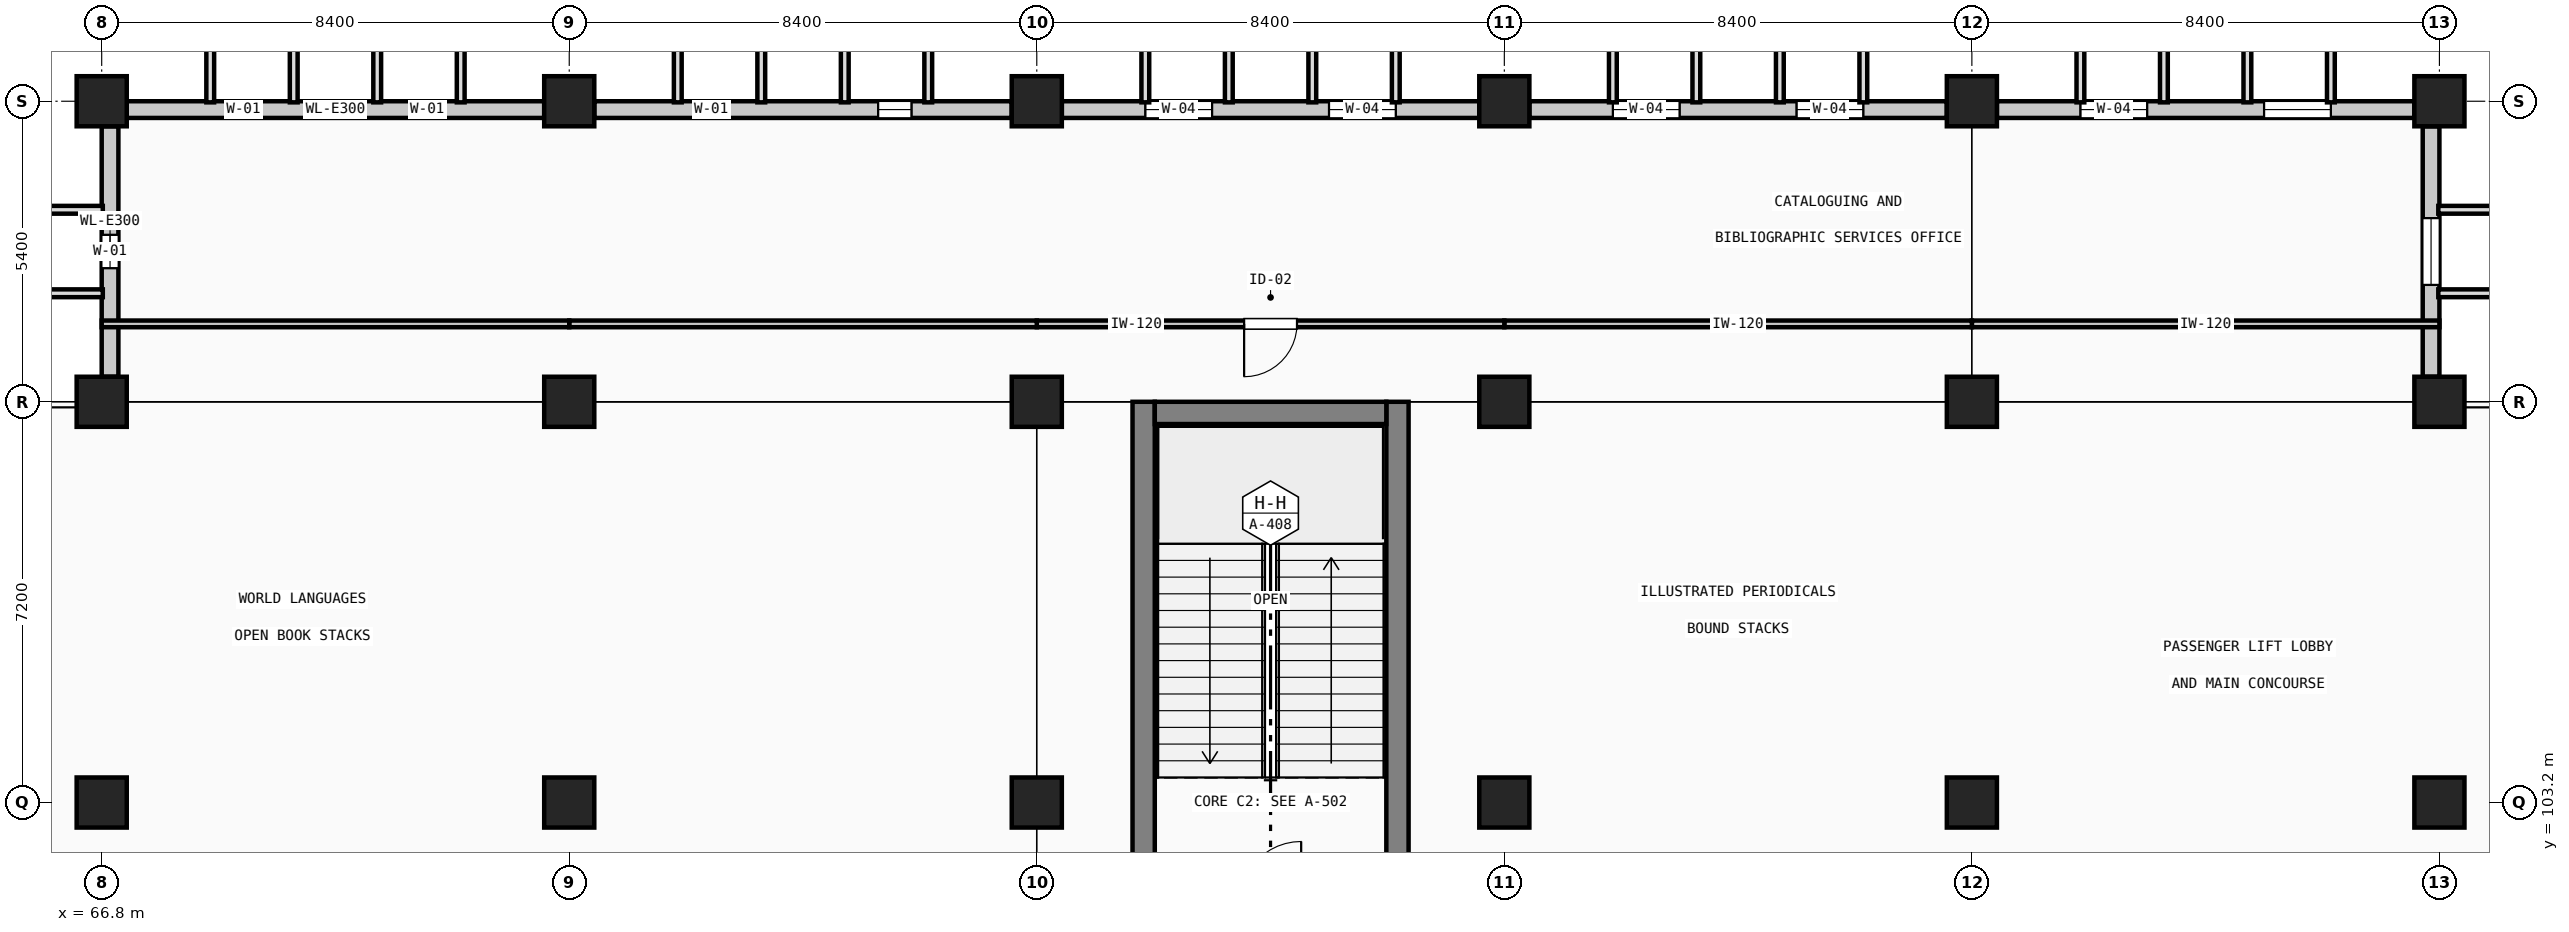
"""IFC4 building model, lengths in metres.
Left out: names, types, materials, properties, quantities, classifications, styles, units other than length and angle.
Written with IfcOpenShell. Run it as: python <this file> out.ifc"""

import sys

from ifc_helpers import new_model, si_unit, direction, frame, frame_2d, origin, origin_2d, place, context, subcontext, project, spatial, rectangle, extrude, element, fill, save


model = new_model("IFC4")
c1 = context("Model", 3, precision=1e-05, world=origin(), true_north=direction((0.0, 1.0)))
c2 = subcontext(c1, "Body", "Model", "MODEL_VIEW")
j1 = project(units=[si_unit("LENGTHUNIT", "METRE"), si_unit("PLANEANGLEUNIT", "RADIAN")], contexts=[c1])
p1 = place(None, origin())
s1 = spatial("IfcSite", under=j1, at=p1, CompositionType="ELEMENT")
p2 = place(p1, origin())
s2 = spatial("IfcBuilding", under=s1, at=p2, CompositionType="ELEMENT")
p3 = place(p2, frame((0.0, 0.0, 4.8)))
s3 = spatial("IfcBuildingStorey", under=s2, at=p3, CompositionType="ELEMENT", Elevation=4.8)
for number, where, z_axis, x_axis in (
    (1, (66.8, 103.2, 0.0), (0.0, 0.0, 1.0), (1.0, 0.0, 0.0)),
    (2, (66.8, 110.4, 0.0), (0.0, 0.0, 1.0), (1.0, 0.0, 0.0)),
    (3, (66.8, 115.8, 0.0), (0.0, 0.0, 1.0), (1.0, 0.0, 0.0)),
    (4, (75.2, 103.2, 0.0), (0.0, 0.0, 1.0), (1.0, 0.0, 0.0)),
    (5, (75.2, 110.4, 0.0), (0.0, 0.0, 1.0), (1.0, 0.0, 0.0)),
    (6, (75.2, 115.8, 0.0), (0.0, 0.0, 1.0), (1.0, 0.0, 0.0)),
    (7, (83.6, 103.2, 0.0), (0.0, 0.0, 1.0), (1.0, 0.0, 0.0)),
    (8, (83.6, 110.4, 0.0), (0.0, 0.0, 1.0), (1.0, 0.0, 0.0)),
    (9, (83.6, 115.8, 0.0), (0.0, 0.0, 1.0), (1.0, 0.0, 0.0)),
    (10, (92.0, 103.2, 0.0), (0.0, 0.0, 1.0), (1.0, 0.0, 0.0)),
    (11, (92.0, 110.4, 0.0), (0.0, 0.0, 1.0), (1.0, 0.0, 0.0)),
    (12, (92.0, 115.8, 0.0), (0.0, 0.0, 1.0), (1.0, 0.0, 0.0)),
    (13, (100.4, 103.2, 0.0), (0.0, 0.0, 1.0), (1.0, 0.0, 0.0)),
    (14, (100.4, 110.4, 0.0), (0.0, 0.0, 1.0), (1.0, 0.0, 0.0)),
    (15, (100.4, 115.8, 0.0), (0.0, 0.0, 1.0), (1.0, 0.0, 0.0)),
    (16, (108.8, 103.2, 0.0), (0.0, 0.0, 1.0), (1.0, 0.0, 0.0)),
    (17, (108.8, 110.4, 0.0), (0.0, 0.0, 1.0), (1.0, 0.0, 0.0)),
    (18, (108.8, 115.8, 0.0), (0.0, 0.0, 1.0), (1.0, 0.0, 0.0)),
):
    element("IfcColumn", number, at=place(p3, frame(where, z_axis=z_axis, x_axis=x_axis)), inside=s3, PredefinedType="COLUMN", context=c2, shape_type="SweptSolid", body=[
        extrude(rectangle(XDim=0.9, YDim=0.9, at=origin_2d()), origin(), (0.0, 0.0, 1.0), 4.8),
    ])
for number, where, z_axis, x_axis in (
    (19, (85.52, 101.2, 0.0), (0.0, 0.0, 1.0), (0.0, 1.0, 0.0)),
    (20, (90.08, 110.4, 0.0), (0.0, 0.0, 1.0), (0.0, -1.0, 0.0)),
):
    element("IfcWall", number, at=place(p3, frame(where, z_axis=z_axis, x_axis=x_axis)), inside=s3, PredefinedType="SHEAR", context=c2, shape_type="SweptSolid", body=[
        extrude(rectangle(XDim=9.2, YDim=0.4, at=frame_2d((4.6, 0.0))), origin(), (0.0, 0.0, 1.0), 4.525),
    ])
p4 = place(p3, frame((85.72, 110.2, 0.0), z_axis=(0.0, 0.0, 1.0), x_axis=(1.0, 0.0, 0.0)))
e21 = element("IfcWall", 21, at=p4, inside=s3, PredefinedType="SHEAR", context=c2, shape_type="SweptSolid", body=[
    extrude(rectangle(XDim=4.16, YDim=0.4, at=frame_2d((2.08, 0.0))), origin(), (0.0, 0.0, 1.0), 4.525),
])
p5 = place(p3, frame((66.95, 110.85, 0.0), z_axis=(0.0, 0.0, 1.0), x_axis=(0.0, 1.0, 0.0)))
e22 = element("IfcWall", 22, at=p5, inside=s3, PredefinedType="SOLIDWALL", context=c2, shape_type="SweptSolid", body=[
    extrude(rectangle(XDim=4.5, YDim=0.3, at=frame_2d((2.25, 0.0))), origin(), (0.0, 0.0, 1.0), 4.2),
])
p6 = place(p5, frame((1.95, 0.0, 0.9)))
e23 = element("IfcOpeningElement", 23, at=p6, cuts=e22, PredefinedType="OPENING", context=c2, shape_type="SweptSolid", body=[
    extrude(rectangle(XDim=0.6, YDim=2.4, at=frame_2d((0.3, 1.2))), frame((0.0, 0.16, 0.0), z_axis=(0.0, -1.0, 0.0), x_axis=(1.0, 0.0, 0.0)), (0.0, 0.0, 1.0), 0.32),
])
p7 = place(p3, frame((67.25, 115.65, 0.0), z_axis=(0.0, 0.0, 1.0), x_axis=(1.0, 0.0, 0.0)))
e24 = element("IfcWall", 24, at=p7, inside=s3, PredefinedType="SOLIDWALL", context=c2, shape_type="SweptSolid", body=[
    extrude(rectangle(XDim=7.5, YDim=0.3, at=frame_2d((3.75, 0.0))), origin(), (0.0, 0.0, 1.0), 3.85),
])
p8 = place(p7, frame((1.8, 0.0, 0.9)))
e25 = element("IfcOpeningElement", 25, at=p8, cuts=e24, PredefinedType="OPENING", context=c2, shape_type="SweptSolid", body=[
    extrude(rectangle(XDim=0.6, YDim=2.4, at=frame_2d((0.3, 1.2))), frame((0.0, 0.16, 0.0), z_axis=(0.0, -1.0, 0.0), x_axis=(1.0, 0.0, 0.0)), (0.0, 0.0, 1.0), 0.32),
])
p9 = place(p7, frame((5.1, 0.0, 0.9)))
e26 = element("IfcOpeningElement", 26, at=p9, cuts=e24, PredefinedType="OPENING", context=c2, shape_type="SweptSolid", body=[
    extrude(rectangle(XDim=0.6, YDim=2.4, at=frame_2d((0.3, 1.2))), frame((0.0, 0.16, 0.0), z_axis=(0.0, -1.0, 0.0), x_axis=(1.0, 0.0, 0.0)), (0.0, 0.0, 1.0), 0.32),
])
p10 = place(p3, frame((75.65, 115.65, 0.0), z_axis=(0.0, 0.0, 1.0), x_axis=(1.0, 0.0, 0.0)))
e27 = element("IfcWall", 27, at=p10, inside=s3, PredefinedType="SOLIDWALL", context=c2, shape_type="SweptSolid", body=[
    extrude(rectangle(XDim=7.5, YDim=0.3, at=frame_2d((3.75, 0.0))), origin(), (0.0, 0.0, 1.0), 3.85),
])
p11 = place(p10, frame((1.8, 0.0, 0.9)))
e28 = element("IfcOpeningElement", 28, at=p11, cuts=e27, PredefinedType="OPENING", context=c2, shape_type="SweptSolid", body=[
    extrude(rectangle(XDim=0.6, YDim=2.4, at=frame_2d((0.3, 1.2))), frame((0.0, 0.16, 0.0), z_axis=(0.0, -1.0, 0.0), x_axis=(1.0, 0.0, 0.0)), (0.0, 0.0, 1.0), 0.32),
])
p12 = place(p10, frame((5.1, 0.0, 0.9)))
e29 = element("IfcOpeningElement", 29, at=p12, cuts=e27, PredefinedType="OPENING", context=c2, shape_type="SweptSolid", body=[
    extrude(rectangle(XDim=0.6, YDim=2.4, at=frame_2d((0.3, 1.2))), frame((0.0, 0.16, 0.0), z_axis=(0.0, -1.0, 0.0), x_axis=(1.0, 0.0, 0.0)), (0.0, 0.0, 1.0), 0.32),
])
p13 = place(p3, frame((84.05, 115.65, 0.0), z_axis=(0.0, 0.0, 1.0), x_axis=(1.0, 0.0, 0.0)))
e30 = element("IfcWall", 30, at=p13, inside=s3, PredefinedType="SOLIDWALL", context=c2, shape_type="SweptSolid", body=[
    extrude(rectangle(XDim=7.5, YDim=0.3, at=frame_2d((3.75, 0.0))), origin(), (0.0, 0.0, 1.0), 3.85),
])
p14 = place(p13, frame((1.5, 0.0, 0.9)))
e31 = element("IfcOpeningElement", 31, at=p14, cuts=e30, PredefinedType="OPENING", context=c2, shape_type="SweptSolid", body=[
    extrude(rectangle(XDim=1.2, YDim=1.8, at=frame_2d((0.6, 0.9))), frame((0.0, 0.16, 0.0), z_axis=(0.0, -1.0, 0.0), x_axis=(1.0, 0.0, 0.0)), (0.0, 0.0, 1.0), 0.32),
])
p15 = place(p13, frame((4.8, 0.0, 0.9)))
e32 = element("IfcOpeningElement", 32, at=p15, cuts=e30, PredefinedType="OPENING", context=c2, shape_type="SweptSolid", body=[
    extrude(rectangle(XDim=1.2, YDim=1.8, at=frame_2d((0.6, 0.9))), frame((0.0, 0.16, 0.0), z_axis=(0.0, -1.0, 0.0), x_axis=(1.0, 0.0, 0.0)), (0.0, 0.0, 1.0), 0.32),
])
p16 = place(p3, frame((92.45, 115.65, 0.0), z_axis=(0.0, 0.0, 1.0), x_axis=(1.0, 0.0, 0.0)))
e33 = element("IfcWall", 33, at=p16, inside=s3, PredefinedType="SOLIDWALL", context=c2, shape_type="SweptSolid", body=[
    extrude(rectangle(XDim=7.5, YDim=0.3, at=frame_2d((3.75, 0.0))), origin(), (0.0, 0.0, 1.0), 3.85),
])
p17 = place(p16, frame((1.5, 0.0, 0.9)))
e34 = element("IfcOpeningElement", 34, at=p17, cuts=e33, PredefinedType="OPENING", context=c2, shape_type="SweptSolid", body=[
    extrude(rectangle(XDim=1.2, YDim=1.8, at=frame_2d((0.6, 0.9))), frame((0.0, 0.16, 0.0), z_axis=(0.0, -1.0, 0.0), x_axis=(1.0, 0.0, 0.0)), (0.0, 0.0, 1.0), 0.32),
])
p18 = place(p16, frame((4.8, 0.0, 0.9)))
e35 = element("IfcOpeningElement", 35, at=p18, cuts=e33, PredefinedType="OPENING", context=c2, shape_type="SweptSolid", body=[
    extrude(rectangle(XDim=1.2, YDim=1.8, at=frame_2d((0.6, 0.9))), frame((0.0, 0.16, 0.0), z_axis=(0.0, -1.0, 0.0), x_axis=(1.0, 0.0, 0.0)), (0.0, 0.0, 1.0), 0.32),
])
p19 = place(p3, frame((100.85, 115.65, 0.0), z_axis=(0.0, 0.0, 1.0), x_axis=(1.0, 0.0, 0.0)))
e36 = element("IfcWall", 36, at=p19, inside=s3, PredefinedType="SOLIDWALL", context=c2, shape_type="SweptSolid", body=[
    extrude(rectangle(XDim=7.5, YDim=0.3, at=frame_2d((3.75, 0.0))), origin(), (0.0, 0.0, 1.0), 3.85),
])
p20 = place(p19, frame((1.5, 0.0, 0.9)))
e37 = element("IfcOpeningElement", 37, at=p20, cuts=e36, PredefinedType="OPENING", context=c2, shape_type="SweptSolid", body=[
    extrude(rectangle(XDim=1.2, YDim=1.8, at=frame_2d((0.6, 0.9))), frame((0.0, 0.16, 0.0), z_axis=(0.0, -1.0, 0.0), x_axis=(1.0, 0.0, 0.0)), (0.0, 0.0, 1.0), 0.32),
])
p21 = place(p19, frame((4.8, 0.0, 0.9)))
e38 = element("IfcOpeningElement", 38, at=p21, cuts=e36, PredefinedType="OPENING", context=c2, shape_type="SweptSolid", body=[
    extrude(rectangle(XDim=1.2, YDim=1.8, at=frame_2d((0.6, 0.9))), frame((0.0, 0.16, 0.0), z_axis=(0.0, -1.0, 0.0), x_axis=(1.0, 0.0, 0.0)), (0.0, 0.0, 1.0), 0.32),
])
p22 = place(p3, frame((108.65, 115.35, 0.0), z_axis=(0.0, 0.0, 1.0), x_axis=(0.0, -1.0, 0.0)))
e39 = element("IfcWall", 39, at=p22, inside=s3, PredefinedType="SOLIDWALL", context=c2, shape_type="SweptSolid", body=[
    extrude(rectangle(XDim=4.5, YDim=0.3, at=frame_2d((2.25, 0.0))), origin(), (0.0, 0.0, 1.0), 4.2),
])
p23 = place(p22, frame((1.65, 0.0, 0.9)))
e40 = element("IfcOpeningElement", 40, at=p23, cuts=e39, PredefinedType="OPENING", context=c2, shape_type="SweptSolid", body=[
    extrude(rectangle(XDim=1.2, YDim=1.8, at=frame_2d((0.6, 0.9))), frame((0.0, 0.16, 0.0), z_axis=(0.0, -1.0, 0.0), x_axis=(1.0, 0.0, 0.0)), (0.0, 0.0, 1.0), 0.32),
])
p24 = place(p3, frame((108.8, 111.8, 0.0), z_axis=(0.0, 0.0, 1.0), x_axis=(-1.0, 0.0, 0.0)))
e41 = element("IfcWall", 41, at=p24, inside=s3, PredefinedType="PARTITIONING", context=c2, shape_type="SweptSolid", body=[
    extrude(rectangle(XDim=8.4, YDim=0.12, at=frame_2d((4.2, 0.0))), origin(), (0.0, 0.0, 1.0), 4.5),
])
p25 = place(p3, frame((100.4, 111.8, 0.0), z_axis=(0.0, 0.0, 1.0), x_axis=(-1.0, 0.0, 0.0)))
e42 = element("IfcWall", 42, at=p25, inside=s3, PredefinedType="PARTITIONING", context=c2, shape_type="SweptSolid", body=[
    extrude(rectangle(XDim=8.4, YDim=0.12, at=frame_2d((4.2, 0.0))), origin(), (0.0, 0.0, 1.0), 4.5),
])
p26 = place(p3, frame((92.0, 111.8, 0.0), z_axis=(0.0, 0.0, 1.0), x_axis=(-1.0, 0.0, 0.0)))
e43 = element("IfcWall", 43, at=p26, inside=s3, PredefinedType="PARTITIONING", context=c2, shape_type="SweptSolid", body=[
    extrude(rectangle(XDim=8.4, YDim=0.12, at=frame_2d((4.2, 0.0))), origin(), (0.0, 0.0, 1.0), 4.5),
])
p27 = place(p26, frame((3.725, 0.0, 0.0)))
e44 = element("IfcOpeningElement", 44, at=p27, cuts=e43, PredefinedType="OPENING", context=c2, shape_type="SweptSolid", body=[
    extrude(rectangle(XDim=0.95, YDim=2.15, at=frame_2d((0.475, 1.075))), frame((0.0, 0.07, 0.0), z_axis=(0.0, -1.0, 0.0), x_axis=(1.0, 0.0, 0.0)), (0.0, 0.0, 1.0), 0.14),
])
p28 = place(p3, frame((83.6, 111.8, 0.0), z_axis=(0.0, 0.0, 1.0), x_axis=(-1.0, 0.0, 0.0)))
e45 = element("IfcWall", 45, at=p28, inside=s3, PredefinedType="PARTITIONING", context=c2, shape_type="SweptSolid", body=[
    extrude(rectangle(XDim=8.4, YDim=0.12, at=frame_2d((4.2, 0.0))), origin(), (0.0, 0.0, 1.0), 4.5),
])
p29 = place(p3, frame((75.2, 111.8, 0.0), z_axis=(0.0, 0.0, 1.0), x_axis=(-1.0, 0.0, 0.0)))
e46 = element("IfcWall", 46, at=p29, inside=s3, PredefinedType="PARTITIONING", context=c2, shape_type="SweptSolid", body=[
    extrude(rectangle(XDim=8.4, YDim=0.12, at=frame_2d((4.2, 0.0))), origin(), (0.0, 0.0, 1.0), 4.5),
])
p30 = place(p6, origin())
e47 = element("IfcWindow", 47, at=p30, inside=s3, PartitioningType="SINGLE_PANEL", PredefinedType="WINDOW", context=c2, shape_type="SweptSolid", body=[
    extrude(rectangle(XDim=0.6, YDim=2.4, at=frame_2d((0.3, 1.2))), frame((0.0, 0.03, 0.0), z_axis=(0.0, -1.0, 0.0), x_axis=(1.0, 0.0, 0.0)), (0.0, 0.0, 1.0), 0.06),
])
fill(e23, e47)
p31 = place(p8, origin())
e48 = element("IfcWindow", 48, at=p31, inside=s3, PartitioningType="SINGLE_PANEL", PredefinedType="WINDOW", context=c2, shape_type="SweptSolid", body=[
    extrude(rectangle(XDim=0.6, YDim=2.4, at=frame_2d((0.3, 1.2))), frame((0.0, 0.03, 0.0), z_axis=(0.0, -1.0, 0.0), x_axis=(1.0, 0.0, 0.0)), (0.0, 0.0, 1.0), 0.06),
])
fill(e25, e48)
p32 = place(p9, origin())
e49 = element("IfcWindow", 49, at=p32, inside=s3, PartitioningType="SINGLE_PANEL", PredefinedType="WINDOW", context=c2, shape_type="SweptSolid", body=[
    extrude(rectangle(XDim=0.6, YDim=2.4, at=frame_2d((0.3, 1.2))), frame((0.0, 0.03, 0.0), z_axis=(0.0, -1.0, 0.0), x_axis=(1.0, 0.0, 0.0)), (0.0, 0.0, 1.0), 0.06),
])
fill(e26, e49)
p33 = place(p11, origin())
e50 = element("IfcWindow", 50, at=p33, inside=s3, PartitioningType="SINGLE_PANEL", PredefinedType="WINDOW", context=c2, shape_type="SweptSolid", body=[
    extrude(rectangle(XDim=0.6, YDim=2.4, at=frame_2d((0.3, 1.2))), frame((0.0, 0.03, 0.0), z_axis=(0.0, -1.0, 0.0), x_axis=(1.0, 0.0, 0.0)), (0.0, 0.0, 1.0), 0.06),
])
fill(e28, e50)
p34 = place(p12, origin())
e51 = element("IfcWindow", 51, at=p34, inside=s3, PartitioningType="SINGLE_PANEL", PredefinedType="WINDOW", context=c2, shape_type="SweptSolid", body=[
    extrude(rectangle(XDim=0.6, YDim=2.4, at=frame_2d((0.3, 1.2))), frame((0.0, 0.03, 0.0), z_axis=(0.0, -1.0, 0.0), x_axis=(1.0, 0.0, 0.0)), (0.0, 0.0, 1.0), 0.06),
])
fill(e29, e51)
p35 = place(p14, origin())
e52 = element("IfcWindow", 52, at=p35, inside=s3, PartitioningType="SINGLE_PANEL", PredefinedType="WINDOW", context=c2, shape_type="SweptSolid", body=[
    extrude(rectangle(XDim=1.2, YDim=1.8, at=frame_2d((0.6, 0.9))), frame((0.0, 0.03, 0.0), z_axis=(0.0, -1.0, 0.0), x_axis=(1.0, 0.0, 0.0)), (0.0, 0.0, 1.0), 0.06),
])
fill(e31, e52)
p36 = place(p15, origin())
e53 = element("IfcWindow", 53, at=p36, inside=s3, PartitioningType="SINGLE_PANEL", PredefinedType="WINDOW", context=c2, shape_type="SweptSolid", body=[
    extrude(rectangle(XDim=1.2, YDim=1.8, at=frame_2d((0.6, 0.9))), frame((0.0, 0.03, 0.0), z_axis=(0.0, -1.0, 0.0), x_axis=(1.0, 0.0, 0.0)), (0.0, 0.0, 1.0), 0.06),
])
fill(e32, e53)
p37 = place(p17, origin())
e54 = element("IfcWindow", 54, at=p37, inside=s3, PartitioningType="SINGLE_PANEL", PredefinedType="WINDOW", context=c2, shape_type="SweptSolid", body=[
    extrude(rectangle(XDim=1.2, YDim=1.8, at=frame_2d((0.6, 0.9))), frame((0.0, 0.03, 0.0), z_axis=(0.0, -1.0, 0.0), x_axis=(1.0, 0.0, 0.0)), (0.0, 0.0, 1.0), 0.06),
])
fill(e34, e54)
p38 = place(p18, origin())
e55 = element("IfcWindow", 55, at=p38, inside=s3, PartitioningType="SINGLE_PANEL", PredefinedType="WINDOW", context=c2, shape_type="SweptSolid", body=[
    extrude(rectangle(XDim=1.2, YDim=1.8, at=frame_2d((0.6, 0.9))), frame((0.0, 0.03, 0.0), z_axis=(0.0, -1.0, 0.0), x_axis=(1.0, 0.0, 0.0)), (0.0, 0.0, 1.0), 0.06),
])
fill(e35, e55)
p39 = place(p20, origin())
e56 = element("IfcWindow", 56, at=p39, inside=s3, PartitioningType="SINGLE_PANEL", PredefinedType="WINDOW", context=c2, shape_type="SweptSolid", body=[
    extrude(rectangle(XDim=1.2, YDim=1.8, at=frame_2d((0.6, 0.9))), frame((0.0, 0.03, 0.0), z_axis=(0.0, -1.0, 0.0), x_axis=(1.0, 0.0, 0.0)), (0.0, 0.0, 1.0), 0.06),
])
fill(e37, e56)
p40 = place(p21, origin())
e57 = element("IfcWindow", 57, at=p40, inside=s3, PartitioningType="SINGLE_PANEL", PredefinedType="WINDOW", context=c2, shape_type="SweptSolid", body=[
    extrude(rectangle(XDim=1.2, YDim=1.8, at=frame_2d((0.6, 0.9))), frame((0.0, 0.03, 0.0), z_axis=(0.0, -1.0, 0.0), x_axis=(1.0, 0.0, 0.0)), (0.0, 0.0, 1.0), 0.06),
])
fill(e38, e57)
p41 = place(p23, origin())
e58 = element("IfcWindow", 58, at=p41, inside=s3, PartitioningType="SINGLE_PANEL", PredefinedType="WINDOW", context=c2, shape_type="SweptSolid", body=[
    extrude(rectangle(XDim=1.2, YDim=1.8, at=frame_2d((0.6, 0.9))), frame((0.0, 0.03, 0.0), z_axis=(0.0, -1.0, 0.0), x_axis=(1.0, 0.0, 0.0)), (0.0, 0.0, 1.0), 0.06),
])
fill(e40, e58)
p42 = place(p27, origin())
e59 = element("IfcDoor", 59, at=p42, inside=s3, OperationType="SINGLE_SWING_RIGHT", PredefinedType="DOOR", context=c2, shape_type="SweptSolid", body=[
    extrude(rectangle(XDim=0.95, YDim=2.15, at=frame_2d((0.475, 1.075))), frame((0.0, 0.025, 0.0), z_axis=(0.0, -1.0, 0.0), x_axis=(1.0, 0.0, 0.0)), (0.0, 0.0, 1.0), 0.05),
])
fill(e44, e59)
save(model, sys.argv[1])
